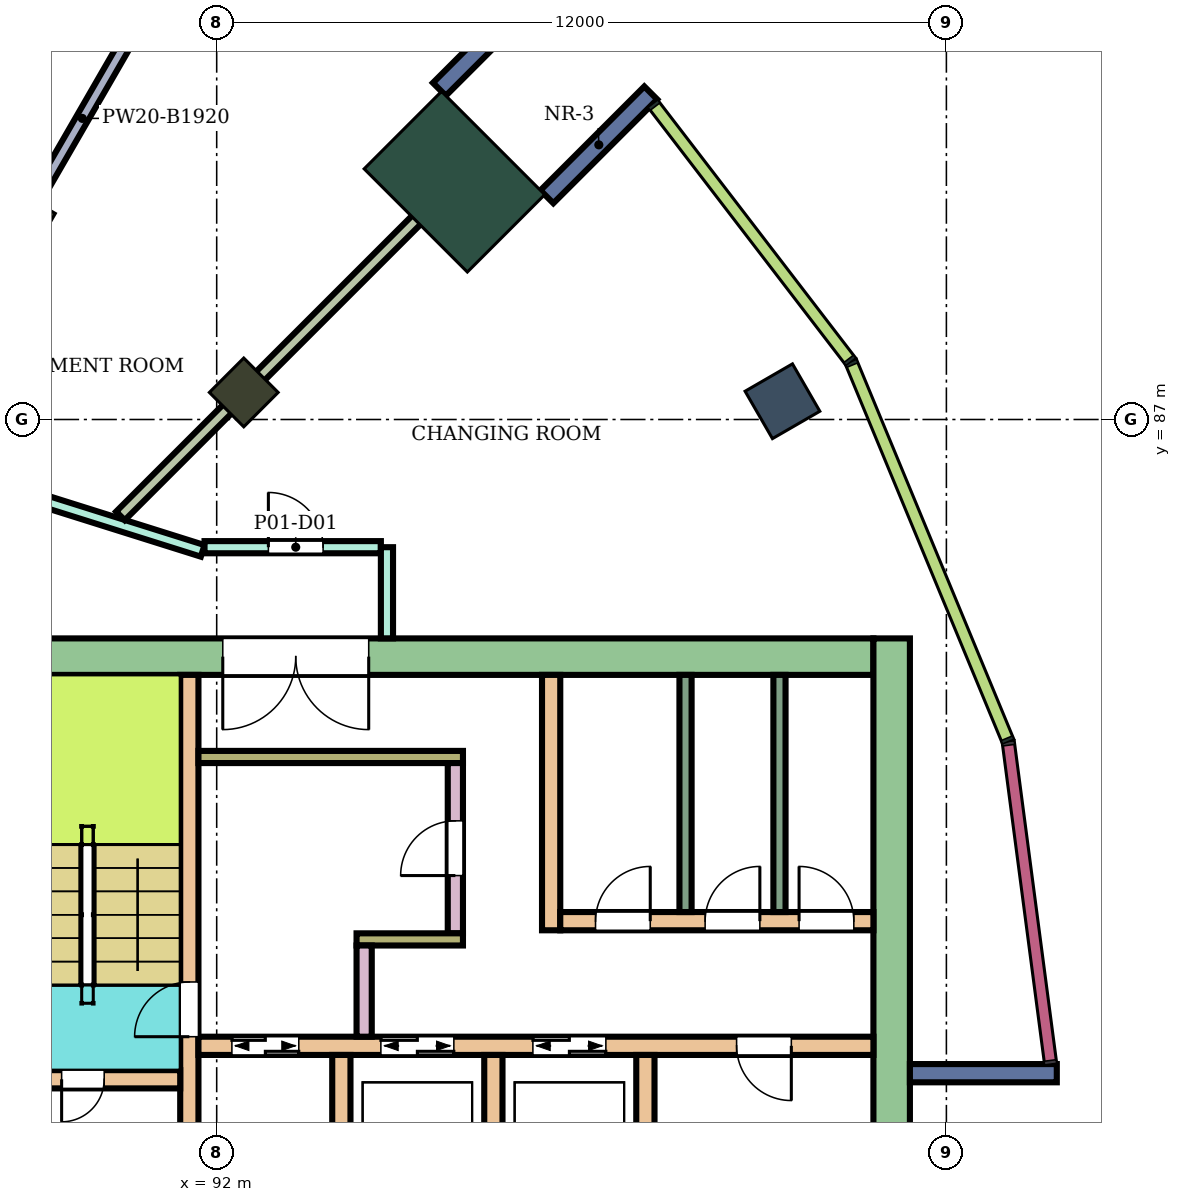
"""IFC4 building model, lengths in metres.
Left out: names, types, materials, properties, quantities, classifications, styles, units other than length and angle.
Written with IfcOpenShell. Run it as: python <this file> out.ifc"""

import sys

from ifc_helpers import new_model, si_unit, direction, frame, frame_2d, origin, origin_2d, place, context, subcontext, project, spatial, rectangle, extrude, element, fill, save


model = new_model("IFC4")
c1 = context("Model", 3, precision=1e-05, world=origin(), true_north=direction((0.0, 1.0)))
c2 = subcontext(c1, "Body", "Model", "MODEL_VIEW")
j1 = project(units=[si_unit("LENGTHUNIT", "METRE"), si_unit("PLANEANGLEUNIT", "RADIAN")], contexts=[c1])
p1 = place(None, origin())
s1 = spatial("IfcSite", under=j1, at=p1, CompositionType="ELEMENT")
p2 = place(p1, origin())
s2 = spatial("IfcBuilding", under=s1, at=p2, CompositionType="ELEMENT")
p3 = place(p2, frame((0.0, 0.0, 270.9)))
s3 = spatial("IfcBuildingStorey", under=s2, at=p3, CompositionType="ELEMENT", Elevation=270.9)
p4 = place(p3, frame((101.304, 87.3, 0.0), z_axis=(0.0, 0.0, 1.0), x_axis=(0.866025403784, 0.5, 0.0)))
e1 = element("IfcColumn", 1, at=p4, inside=s3, PredefinedType="COLUMN", context=c2, shape_type="SweptSolid", body=[
    extrude(rectangle(XDim=0.9, YDim=0.9, at=origin_2d()), origin(), (0.0, 0.0, 1.0), 4.8),
])
for number, where, z_axis, x_axis in (
    (2, (92.445, 87.445, 0.0), (0.0, 0.0, 1.0), (0.707, 0.707, 0.0)),
    (3, (88.8, 90.242, 0.0), (0.0, 0.0, 1.0), (0.5, 0.866, 0.0)),
):
    element("IfcColumn", number, at=place(p3, frame(where, z_axis=z_axis, x_axis=x_axis)), inside=s3, PredefinedType="COLUMN", context=c2, shape_type="SweptSolid", body=[
        extrude(rectangle(XDim=0.8, YDim=0.8, at=origin_2d()), origin(), (0.0, 0.0, 1.0), 4.8),
    ])
p5 = place(p3, frame((95.91, 90.91, 0.0), z_axis=(0.0, 0.0, 1.0), x_axis=(0.707106781187, 0.707106781187, 0.0)))
e4 = element("IfcColumn", 4, at=p5, inside=s3, PredefinedType="COLUMN", context=c2, shape_type="SweptSolid", body=[
    extrude(rectangle(XDim=1.8, YDim=2.4, at=origin_2d()), origin(), (0.0, 0.0, 1.0), 4.8),
])
p6 = place(p3, frame((87.9, 83.1, 0.0), z_axis=(0.0, 0.0, 1.0), x_axis=(1.0, 0.0, 0.0)))
e5 = element("IfcWall", 5, at=p6, inside=s3, PredefinedType="SHEAR", context=c2, shape_type="SweptSolid", body=[
    extrude(rectangle(XDim=14.9, YDim=0.6, at=frame_2d((7.45, 0.0))), origin(), (0.0, 0.0, 1.0), 4.48),
])
p7 = place(p6, frame((4.2, 0.0, 0.0)))
e6 = element("IfcOpeningElement", 6, at=p7, cuts=e5, PredefinedType="OPENING", context=c2, shape_type="SweptSolid", body=[
    extrude(rectangle(XDim=2.4, YDim=2.4, at=frame_2d((1.2, 1.2))), frame((0.0, 0.31, 0.0), z_axis=(0.0, -1.0, 0.0), x_axis=(1.0, 0.0, 0.0)), (0.0, 0.0, 1.0), 0.62),
])
p8 = place(p3, frame((103.1, 66.6, 0.0), z_axis=(0.0, 0.0, 1.0), x_axis=(0.0, 1.0, 0.0)))
e7 = element("IfcWall", 7, at=p8, inside=s3, PredefinedType="SHEAR", context=c2, shape_type="SweptSolid", body=[
    extrude(rectangle(XDim=16.8, YDim=0.6, at=frame_2d((8.4, 0.0))), origin(), (0.0, 0.0, 1.0), 4.48),
])
p9 = place(p3, frame((91.55, 75.0, 0.0), z_axis=(0.0, 0.0, 1.0), x_axis=(0.0, 1.0, 0.0)))
e8 = element("IfcWall", 8, at=p9, inside=s3, PredefinedType="SHEAR", context=c2, shape_type="SweptSolid", body=[
    extrude(rectangle(XDim=7.8, YDim=0.3, at=frame_2d((3.9, 0.0))), origin(), (0.0, 0.0, 1.0), 4.48),
])
p10 = place(p9, frame((1.85, 0.0, 0.0)))
e9 = element("IfcOpeningElement", 9, at=p10, cuts=e8, PredefinedType="OPENING", context=c2, shape_type="SweptSolid", body=[
    extrude(rectangle(XDim=0.9, YDim=2.1, at=frame_2d((0.45, 1.05))), frame((0.0, 0.16, 0.0), z_axis=(0.0, -1.0, 0.0), x_axis=(1.0, 0.0, 0.0)), (0.0, 0.0, 1.0), 0.32),
])
p11 = place(p3, frame((88.35, 76.15, 0.0), z_axis=(0.0, 0.0, 1.0), x_axis=(1.0, 0.0, 0.0)))
e10 = element("IfcWall", 10, at=p11, inside=s3, PredefinedType="SHEAR", context=c2, shape_type="SweptSolid", body=[
    extrude(rectangle(XDim=3.05, YDim=0.3, at=frame_2d((1.525, 0.0))), origin(), (0.0, 0.0, 1.0), 4.48),
])
p12 = place(p11, frame((1.1, 0.0, 0.0)))
e11 = element("IfcOpeningElement", 11, at=p12, cuts=e10, PredefinedType="OPENING", context=c2, shape_type="SweptSolid", body=[
    extrude(rectangle(XDim=0.7, YDim=2.0, at=frame_2d((0.35, 1.0))), frame((0.0, 0.16, 0.0), z_axis=(0.0, -1.0, 0.0), x_axis=(1.0, 0.0, 0.0)), (0.0, 0.0, 1.0), 0.32),
])
p13 = place(p3, frame((91.7, 76.7, 0.0), z_axis=(0.0, 0.0, 1.0), x_axis=(1.0, 0.0, 0.0)))
e12 = element("IfcWall", 12, at=p13, inside=s3, PredefinedType="SHEAR", context=c2, shape_type="SweptSolid", body=[
    extrude(rectangle(XDim=11.1, YDim=0.3, at=frame_2d((5.55, 0.0))), origin(), (0.0, 0.0, 1.0), 4.48),
])
p14 = place(p13, frame((0.55, 0.0, 0.0)))
e13 = element("IfcOpeningElement", 13, at=p14, cuts=e12, PredefinedType="OPENING", context=c2, shape_type="SweptSolid", body=[
    extrude(rectangle(XDim=1.1, YDim=2.1, at=frame_2d((0.55, 1.05))), frame((0.0, 0.16, 0.0), z_axis=(0.0, -1.0, 0.0), x_axis=(1.0, 0.0, 0.0)), (0.0, 0.0, 1.0), 0.32),
])
p15 = place(p13, frame((3.0, 0.0, 0.0)))
e14 = element("IfcOpeningElement", 14, at=p15, cuts=e12, PredefinedType="OPENING", context=c2, shape_type="SweptSolid", body=[
    extrude(rectangle(XDim=1.2, YDim=2.1, at=frame_2d((0.6, 1.05))), frame((0.0, 0.16, 0.0), z_axis=(0.0, -1.0, 0.0), x_axis=(1.0, 0.0, 0.0)), (0.0, 0.0, 1.0), 0.32),
])
p16 = place(p13, frame((5.5, 0.0, 0.0)))
e15 = element("IfcOpeningElement", 15, at=p16, cuts=e12, PredefinedType="OPENING", context=c2, shape_type="SweptSolid", body=[
    extrude(rectangle(XDim=1.2, YDim=2.1, at=frame_2d((0.6, 1.05))), frame((0.0, 0.16, 0.0), z_axis=(0.0, -1.0, 0.0), x_axis=(1.0, 0.0, 0.0)), (0.0, 0.0, 1.0), 0.32),
])
p17 = place(p13, frame((8.85, 0.0, 0.0)))
e16 = element("IfcOpeningElement", 16, at=p17, cuts=e12, PredefinedType="OPENING", context=c2, shape_type="SweptSolid", body=[
    extrude(rectangle(XDim=0.9, YDim=2.1, at=frame_2d((0.45, 1.05))), frame((0.0, 0.16, 0.0), z_axis=(0.0, -1.0, 0.0), x_axis=(1.0, 0.0, 0.0)), (0.0, 0.0, 1.0), 0.32),
])
for number, where, z_axis, x_axis in (
    (17, (94.05, 74.0, 0.0), (0.0, 0.0, 1.0), (0.0, 1.0, 0.0)),
    (18, (96.55, 74.0, 0.0), (0.0, 0.0, 1.0), (0.0, 1.0, 0.0)),
    (19, (99.05, 74.0, 0.0), (0.0, 0.0, 1.0), (0.0, 1.0, 0.0)),
):
    element("IfcWall", number, at=place(p3, frame(where, z_axis=z_axis, x_axis=x_axis)), inside=s3, PredefinedType="SHEAR", context=c2, shape_type="SweptSolid", body=[
        extrude(rectangle(XDim=2.55, YDim=0.3, at=frame_2d((1.275, 0.0))), origin(), (0.0, 0.0, 1.0), 4.48),
    ])
p18 = place(p3, frame((91.7, 81.45, 0.0), z_axis=(0.0, 0.0, 1.0), x_axis=(1.0, 0.0, 0.0)))
e20 = element("IfcWall", 20, at=p18, inside=s3, PredefinedType="SHEAR", context=c2, shape_type="SweptSolid", body=[
    extrude(rectangle(XDim=4.35, YDim=0.2, at=frame_2d((2.175, 0.0))), origin(), (0.0, 0.0, 1.0), 4.48),
])
p19 = place(p3, frame((95.925, 78.55, 0.0), z_axis=(0.0, 0.0, 1.0), x_axis=(0.0, 1.0, 0.0)))
e21 = element("IfcWall", 21, at=p19, inside=s3, PredefinedType="SHEAR", context=c2, shape_type="SweptSolid", body=[
    extrude(rectangle(XDim=2.8, YDim=0.25, at=frame_2d((1.4, 0.0))), origin(), (0.0, 0.0, 1.0), 4.48),
])
p20 = place(p19, frame((0.95, 0.0, 0.0)))
e22 = element("IfcOpeningElement", 22, at=p20, cuts=e21, PredefinedType="OPENING", context=c2, shape_type="SweptSolid", body=[
    extrude(rectangle(XDim=0.9, YDim=2.1, at=frame_2d((0.45, 1.05))), frame((0.0, 0.135, 0.0), z_axis=(0.0, -1.0, 0.0), x_axis=(1.0, 0.0, 0.0)), (0.0, 0.0, 1.0), 0.27),
])
p21 = place(p3, frame((94.3, 78.45, 0.0), z_axis=(0.0, 0.0, 1.0), x_axis=(1.0, 0.0, 0.0)))
e23 = element("IfcWall", 23, at=p21, inside=s3, PredefinedType="SHEAR", context=c2, shape_type="SweptSolid", body=[
    extrude(rectangle(XDim=1.75, YDim=0.2, at=frame_2d((0.875, 0.0))), origin(), (0.0, 0.0, 1.0), 4.48),
])
p22 = place(p3, frame((94.425, 76.85, 0.0), z_axis=(0.0, 0.0, 1.0), x_axis=(0.0, 1.0, 0.0)))
e24 = element("IfcWall", 24, at=p22, inside=s3, PredefinedType="SHEAR", context=c2, shape_type="SweptSolid", body=[
    extrude(rectangle(XDim=1.5, YDim=0.25, at=frame_2d((0.75, 0.0))), origin(), (0.0, 0.0, 1.0), 4.48),
])
p23 = place(p3, frame((97.5, 78.6, 0.0), z_axis=(0.0, 0.0, 1.0), x_axis=(0.0, 1.0, 0.0)))
e25 = element("IfcWall", 25, at=p23, inside=s3, PredefinedType="SHEAR", context=c2, shape_type="SweptSolid", body=[
    extrude(rectangle(XDim=4.2, YDim=0.3, at=frame_2d((2.1, 0.0))), origin(), (0.0, 0.0, 1.0), 4.48),
])
p24 = place(p3, frame((97.65, 78.75, 0.0), z_axis=(0.0, 0.0, 1.0), x_axis=(1.0, 0.0, 0.0)))
e26 = element("IfcWall", 26, at=p24, inside=s3, PredefinedType="SHEAR", context=c2, shape_type="SweptSolid", body=[
    extrude(rectangle(XDim=5.15, YDim=0.3, at=frame_2d((2.575, 0.0))), origin(), (0.0, 0.0, 1.0), 4.48),
])
p25 = place(p24, frame((0.58, 0.0, 0.0)))
e27 = element("IfcOpeningElement", 27, at=p25, cuts=e26, PredefinedType="OPENING", context=c2, shape_type="SweptSolid", body=[
    extrude(rectangle(XDim=0.9, YDim=2.1, at=frame_2d((0.45, 1.05))), frame((0.0, 0.16, 0.0), z_axis=(0.0, -1.0, 0.0), x_axis=(1.0, 0.0, 0.0)), (0.0, 0.0, 1.0), 0.32),
])
p26 = place(p24, frame((2.383, 0.0, 0.0)))
e28 = element("IfcOpeningElement", 28, at=p26, cuts=e26, PredefinedType="OPENING", context=c2, shape_type="SweptSolid", body=[
    extrude(rectangle(XDim=0.9, YDim=2.1, at=frame_2d((0.45, 1.05))), frame((0.0, 0.16, 0.0), z_axis=(0.0, -1.0, 0.0), x_axis=(1.0, 0.0, 0.0)), (0.0, 0.0, 1.0), 0.32),
])
p27 = place(p24, frame((3.927, 0.0, 0.0)))
e29 = element("IfcOpeningElement", 29, at=p27, cuts=e26, PredefinedType="OPENING", context=c2, shape_type="SweptSolid", body=[
    extrude(rectangle(XDim=0.9, YDim=2.1, at=frame_2d((0.45, 1.05))), frame((0.0, 0.16, 0.0), z_axis=(0.0, -1.0, 0.0), x_axis=(1.0, 0.0, 0.0)), (0.0, 0.0, 1.0), 0.32),
])
for number, where, z_axis, x_axis in (
    (30, (103.4, 76.25, 0.0), (0.0, 0.0, 1.0), (1.0, 0.0, 0.0)),
    (31, (97.43, 90.662, 0.0), (0.0, 0.0, 1.0), (0.707, 0.707, 0.0)),
    (32, (95.662, 92.43, 0.0), (0.0, 0.0, 1.0), (0.707, 0.707, 0.0)),
):
    element("IfcWall", number, at=place(p3, frame(where, z_axis=z_axis, x_axis=x_axis)), inside=s3, PredefinedType="NOTDEFINED", context=c2, shape_type="SweptSolid", body=[
        extrude(rectangle(XDim=2.416, YDim=0.3, at=frame_2d((1.208, 0.0))), origin(), (0.0, 0.0, 1.0), 4.8),
    ])
p28 = place(p3, frame((86.314, 86.556, 0.0), z_axis=(0.0, 0.0, 1.0), x_axis=(0.953912400139, -0.300085209334, 0.0)))
e33 = element("IfcWall", 33, at=p28, inside=s3, PredefinedType="PARTITIONING", context=c2, shape_type="SweptSolid", body=[
    extrude(rectangle(XDim=5.719, YDim=0.2, at=frame_2d((2.86, 0.0))), origin(), (0.0, 0.0, 1.0), 4.35),
])
p29 = place(p28, frame((1.801, 0.0, 0.0)))
e34 = element("IfcOpeningElement", 34, at=p29, cuts=e33, PredefinedType="OPENING", context=c2, shape_type="SweptSolid", body=[
    extrude(rectangle(XDim=0.9, YDim=2.1, at=frame_2d((0.45, 1.05))), frame((0.0, 0.11, 0.0), z_axis=(0.0, -1.0, 0.0), x_axis=(1.0, 0.0, 0.0)), (0.0, 0.0, 1.0), 0.22),
])
p30 = place(p3, frame((86.677, 86.563, 0.0), z_axis=(0.0, 0.0, 1.0), x_axis=(0.500143584568, 0.865942489324, 0.0)))
e35 = element("IfcWall", 35, at=p30, inside=s3, PredefinedType="PARTITIONING", context=c2, shape_type="SweptSolid", body=[
    extrude(rectangle(XDim=12.445, YDim=0.2, at=frame_2d((6.222, 0.0))), origin(), (0.0, 0.0, 1.0), 2.88),
])
p31 = place(p3, frame((90.417, 85.415, 0.0), z_axis=(0.0, 0.0, 1.0), x_axis=(0.707164431244, 0.707049126429, 0.0)))
e36 = element("IfcWall", 36, at=p31, inside=s3, PredefinedType="PARTITIONING", context=c2, shape_type="SweptSolid", body=[
    extrude(rectangle(XDim=8.469, YDim=0.2, at=frame_2d((4.235, 0.0))), origin(), (0.0, 0.0, 1.0), 3.08),
])
p32 = place(p3, frame((91.8, 84.9, 0.0), z_axis=(0.0, 0.0, 1.0), x_axis=(1.0, 0.0, 0.0)))
e37 = element("IfcWall", 37, at=p32, inside=s3, PredefinedType="PARTITIONING", context=c2, shape_type="SweptSolid", body=[
    extrude(rectangle(XDim=2.9, YDim=0.2, at=frame_2d((1.45, 0.0))), origin(), (0.0, 0.0, 1.0), 4.35),
])
p33 = place(p32, frame((1.05, 0.0, 0.0)))
e38 = element("IfcOpeningElement", 38, at=p33, cuts=e37, PredefinedType="OPENING", context=c2, shape_type="SweptSolid", body=[
    extrude(rectangle(XDim=0.9, YDim=2.1, at=frame_2d((0.45, 1.05))), frame((0.0, 0.11, 0.0), z_axis=(0.0, -1.0, 0.0), x_axis=(1.0, 0.0, 0.0)), (0.0, 0.0, 1.0), 0.22),
])
p34 = place(p3, frame((94.8, 83.401, 0.0), z_axis=(0.0, 0.0, 1.0), x_axis=(0.0, 1.0, 0.0)))
e39 = element("IfcWall", 39, at=p34, inside=s3, PredefinedType="PARTITIONING", context=c2, shape_type="SweptSolid", body=[
    extrude(rectangle(XDim=1.499, YDim=0.2, at=frame_2d((0.75, 0.0))), origin(), (0.0, 0.0, 1.0), 4.35),
])
for number, where, z_axis, x_axis in (
    (40, (99.71, 78.9, 0.0), (0.0, 0.0, 1.0), (0.0, 1.0, 0.0)),
    (41, (101.255, 78.9, 0.0), (0.0, 0.0, 1.0), (0.0, 1.0, 0.0)),
):
    element("IfcWall", number, at=place(p3, frame(where, z_axis=z_axis, x_axis=x_axis)), inside=s3, PredefinedType="PARTITIONING", context=c2, shape_type="SweptSolid", body=[
        extrude(rectangle(XDim=3.9, YDim=0.2, at=frame_2d((1.95, 0.0))), origin(), (0.0, 0.0, 1.0), 4.48),
    ])
p35 = place(p33, origin())
e42 = element("IfcDoor", 42, at=p35, inside=s3, OperationType="SINGLE_SWING_LEFT", PredefinedType="DOOR", context=c2, shape_type="SweptSolid", body=[
    extrude(rectangle(XDim=0.9, YDim=2.1, at=frame_2d((0.45, 1.05))), frame((0.0, 0.025, 0.0), z_axis=(0.0, -1.0, 0.0), x_axis=(1.0, 0.0, 0.0)), (0.0, 0.0, 1.0), 0.05),
])
fill(e38, e42)
p36 = place(p12, frame((0.7, 0.0, 0.0), z_axis=(0.0, 0.0, 1.0), x_axis=(-1.0, 0.0, 0.0)))
e43 = element("IfcDoor", 43, at=p36, inside=s3, OperationType="SINGLE_SWING_RIGHT", PredefinedType="DOOR", context=c2, shape_type="SweptSolid", body=[
    extrude(rectangle(XDim=0.7, YDim=2.0, at=frame_2d((0.35, 1.0))), frame((0.0, 0.025, 0.0), z_axis=(0.0, -1.0, 0.0), x_axis=(1.0, 0.0, 0.0)), (0.0, 0.0, 1.0), 0.05),
])
fill(e11, e43)
p37 = place(p10, origin())
e44 = element("IfcDoor", 44, at=p37, inside=s3, OperationType="SINGLE_SWING_LEFT", PredefinedType="DOOR", context=c2, shape_type="SweptSolid", body=[
    extrude(rectangle(XDim=0.9, YDim=2.1, at=frame_2d((0.45, 1.05))), frame((0.0, 0.025, 0.0), z_axis=(0.0, -1.0, 0.0), x_axis=(1.0, 0.0, 0.0)), (0.0, 0.0, 1.0), 0.05),
])
fill(e9, e44)
p38 = place(p14, origin())
e45 = element("IfcDoor", 45, at=p38, inside=s3, OperationType="DOUBLE_DOOR_SLIDING", PredefinedType="DOOR", context=c2, shape_type="SweptSolid", body=[
    extrude(rectangle(XDim=1.1, YDim=2.1, at=frame_2d((0.55, 1.05))), frame((0.0, 0.025, 0.0), z_axis=(0.0, -1.0, 0.0), x_axis=(1.0, 0.0, 0.0)), (0.0, 0.0, 1.0), 0.05),
])
fill(e13, e45)
p39 = place(p15, origin())
e46 = element("IfcDoor", 46, at=p39, inside=s3, OperationType="DOUBLE_DOOR_SLIDING", PredefinedType="DOOR", context=c2, shape_type="SweptSolid", body=[
    extrude(rectangle(XDim=1.2, YDim=2.1, at=frame_2d((0.6, 1.05))), frame((0.0, 0.025, 0.0), z_axis=(0.0, -1.0, 0.0), x_axis=(1.0, 0.0, 0.0)), (0.0, 0.0, 1.0), 0.05),
])
fill(e14, e46)
p40 = place(p16, origin())
e47 = element("IfcDoor", 47, at=p40, inside=s3, OperationType="DOUBLE_DOOR_SLIDING", PredefinedType="DOOR", context=c2, shape_type="SweptSolid", body=[
    extrude(rectangle(XDim=1.2, YDim=2.1, at=frame_2d((0.6, 1.05))), frame((0.0, 0.025, 0.0), z_axis=(0.0, -1.0, 0.0), x_axis=(1.0, 0.0, 0.0)), (0.0, 0.0, 1.0), 0.05),
])
fill(e15, e47)
p41 = place(p17, frame((0.9, 0.0, 0.0), z_axis=(0.0, 0.0, 1.0), x_axis=(-1.0, 0.0, 0.0)))
e48 = element("IfcDoor", 48, at=p41, inside=s3, OperationType="SINGLE_SWING_LEFT", PredefinedType="DOOR", context=c2, shape_type="SweptSolid", body=[
    extrude(rectangle(XDim=0.9, YDim=2.1, at=frame_2d((0.45, 1.05))), frame((0.0, 0.025, 0.0), z_axis=(0.0, -1.0, 0.0), x_axis=(1.0, 0.0, 0.0)), (0.0, 0.0, 1.0), 0.05),
])
fill(e16, e48)
p42 = place(p20, origin())
e49 = element("IfcDoor", 49, at=p42, inside=s3, OperationType="SINGLE_SWING_LEFT", PredefinedType="DOOR", context=c2, shape_type="SweptSolid", body=[
    extrude(rectangle(XDim=0.9, YDim=2.1, at=frame_2d((0.45, 1.05))), frame((0.0, 0.025, 0.0), z_axis=(0.0, -1.0, 0.0), x_axis=(1.0, 0.0, 0.0)), (0.0, 0.0, 1.0), 0.05),
])
fill(e22, e49)
p43 = place(p25, origin())
e50 = element("IfcDoor", 50, at=p43, inside=s3, OperationType="SINGLE_SWING_RIGHT", PredefinedType="DOOR", context=c2, shape_type="SweptSolid", body=[
    extrude(rectangle(XDim=0.9, YDim=2.1, at=frame_2d((0.45, 1.05))), frame((0.0, 0.025, 0.0), z_axis=(0.0, -1.0, 0.0), x_axis=(1.0, 0.0, 0.0)), (0.0, 0.0, 1.0), 0.05),
])
fill(e27, e50)
p44 = place(p26, origin())
e51 = element("IfcDoor", 51, at=p44, inside=s3, OperationType="SINGLE_SWING_RIGHT", PredefinedType="DOOR", context=c2, shape_type="SweptSolid", body=[
    extrude(rectangle(XDim=0.9, YDim=2.1, at=frame_2d((0.45, 1.05))), frame((0.0, 0.025, 0.0), z_axis=(0.0, -1.0, 0.0), x_axis=(1.0, 0.0, 0.0)), (0.0, 0.0, 1.0), 0.05),
])
fill(e28, e51)
p45 = place(p27, origin())
e52 = element("IfcDoor", 52, at=p45, inside=s3, OperationType="SINGLE_SWING_LEFT", PredefinedType="DOOR", context=c2, shape_type="SweptSolid", body=[
    extrude(rectangle(XDim=0.9, YDim=2.1, at=frame_2d((0.45, 1.05))), frame((0.0, 0.025, 0.0), z_axis=(0.0, -1.0, 0.0), x_axis=(1.0, 0.0, 0.0)), (0.0, 0.0, 1.0), 0.05),
])
fill(e29, e52)
p46 = place(p7, frame((2.4, 0.0, 0.0), z_axis=(0.0, 0.0, 1.0), x_axis=(-1.0, 0.0, 0.0)))
e53 = element("IfcDoor", 53, at=p46, inside=s3, OperationType="DOUBLE_DOOR_SINGLE_SWING", PredefinedType="DOOR", context=c2, shape_type="SweptSolid", body=[
    extrude(rectangle(XDim=2.4, YDim=2.4, at=frame_2d((1.2, 1.2))), frame((0.0, 0.025, 0.0), z_axis=(0.0, -1.0, 0.0), x_axis=(1.0, 0.0, 0.0)), (0.0, 0.0, 1.0), 0.05),
])
fill(e6, e53)
save(model, sys.argv[1])
